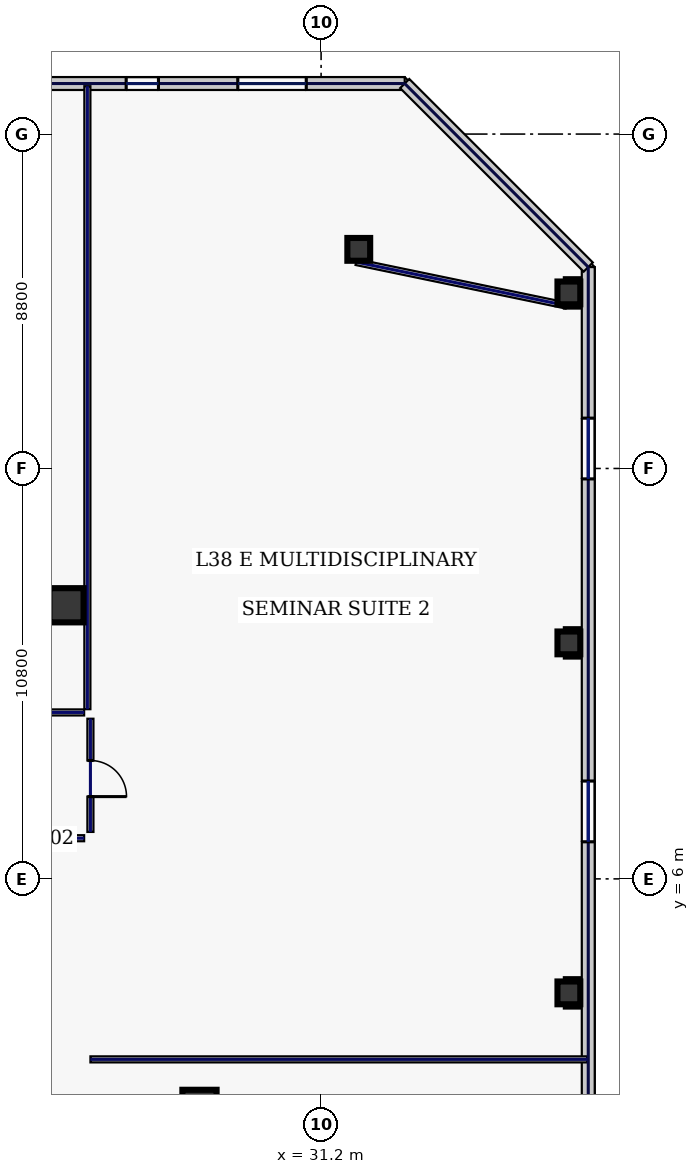
"""IFC4 building model, lengths in metres.
Left out: names, types, materials, properties, quantities, classifications, styles, units other than length and angle.
Written with IfcOpenShell. Run it as: python <this file> out.ifc"""

import sys

from ifc_helpers import new_model, si_unit, direction, frame, frame_2d, origin, origin_2d, place, context, subcontext, project, spatial, rectangle, hollow_rectangle, extrude, element, fill, save


model = new_model("IFC4")
c1 = context("Model", 3, precision=1e-05, world=origin(), true_north=direction((0.0, 1.0)))
c2 = subcontext(c1, "Body", "Model", "MODEL_VIEW")
j1 = project(units=[si_unit("LENGTHUNIT", "METRE"), si_unit("PLANEANGLEUNIT", "RADIAN")], contexts=[c1])
p1 = place(None, origin())
s1 = spatial("IfcSite", under=j1, at=p1, CompositionType="ELEMENT")
p2 = place(p1, origin())
s2 = spatial("IfcBuilding", under=s1, at=p2, CompositionType="ELEMENT")
p3 = place(p2, frame((0.0, 0.0, 168.2)))
s3 = spatial("IfcBuildingStorey", under=s2, at=p3, CompositionType="ELEMENT", Elevation=168.2)
for number, where, z_axis, x_axis in (
    (1, (24.5, 13.2, 0.0), (0.0, 0.0, 1.0), (1.0, 0.0, 0.0)),
    (2, (28.0, 0.0, 0.0), (0.0, 0.0, 1.0), (1.0, 0.0, 0.0)),
):
    element("IfcColumn", number, at=place(p3, frame(where, z_axis=z_axis, x_axis=x_axis)), inside=s3, PredefinedType="COLUMN", context=c2, shape_type="SweptSolid", body=[
        extrude(hollow_rectangle(XDim=0.9, YDim=0.9, WallThickness=0.04, at=origin_2d()), origin(), (0.0, 0.0, 1.0), 3.74),
    ])
for number, where, z_axis, x_axis in (
    (3, (32.191, 22.566, 0.0), (0.0, 0.0, 1.0), (1.0, 0.0, 0.0)),
    (4, (37.72, 3.0, 0.0), (0.0, 0.0, 1.0), (1.0, 0.0, 0.0)),
    (5, (37.72, 12.21, 0.0), (0.0, 0.0, 1.0), (1.0, 0.0, 0.0)),
    (6, (37.72, 21.42, 0.0), (0.0, 0.0, 1.0), (1.0, 0.0, 0.0)),
):
    element("IfcColumn", number, at=place(p3, frame(where, z_axis=z_axis, x_axis=x_axis)), inside=s3, PredefinedType="COLUMN", context=c2, shape_type="SweptSolid", body=[
        extrude(hollow_rectangle(XDim=0.6, YDim=0.6, WallThickness=0.028, at=origin_2d()), origin(), (0.0, 0.0, 1.0), 3.74),
    ])
p4 = place(p3, frame((33.4, 26.93, 0.0), z_axis=(0.0, 0.0, 1.0), x_axis=(-1.0, 0.0, 0.0)))
e7 = element("IfcWall", 7, at=p4, inside=s3, PredefinedType="STANDARD", context=c2, shape_type="SweptSolid", body=[
    extrude(rectangle(XDim=20.09, YDim=0.34, at=frame_2d((10.045, 0.0))), origin(), (0.0, 0.0, 1.0), 3.74),
])
p5 = place(p4, frame((15.005, 0.0, 0.7)))
e8 = element("IfcOpeningElement", 8, at=p5, cuts=e7, PredefinedType="OPENING", context=c2, shape_type="SweptSolid", body=[
    extrude(rectangle(XDim=1.8, YDim=2.2, at=frame_2d((0.9, 1.1))), frame((0.0, 0.18, 0.0), z_axis=(0.0, -1.0, 0.0), x_axis=(1.0, 0.0, 0.0)), (0.0, 0.0, 1.0), 0.36),
])
p6 = place(p4, frame((11.071, 0.0, 0.7)))
e9 = element("IfcOpeningElement", 9, at=p6, cuts=e7, PredefinedType="OPENING", context=c2, shape_type="SweptSolid", body=[
    extrude(rectangle(XDim=0.85, YDim=1.85, at=frame_2d((0.425, 0.925))), frame((0.0, 0.18, 0.0), z_axis=(0.0, -1.0, 0.0), x_axis=(1.0, 0.0, 0.0)), (0.0, 0.0, 1.0), 0.36),
])
p7 = place(p4, frame((6.48, 0.0, 0.7)))
e10 = element("IfcOpeningElement", 10, at=p7, cuts=e7, PredefinedType="OPENING", context=c2, shape_type="SweptSolid", body=[
    extrude(rectangle(XDim=0.85, YDim=1.85, at=frame_2d((0.425, 0.925))), frame((0.0, 0.18, 0.0), z_axis=(0.0, -1.0, 0.0), x_axis=(1.0, 0.0, 0.0)), (0.0, 0.0, 1.0), 0.36),
])
p8 = place(p4, frame((2.591, 0.0, 0.7)))
e11 = element("IfcOpeningElement", 11, at=p8, cuts=e7, PredefinedType="OPENING", context=c2, shape_type="SweptSolid", body=[
    extrude(rectangle(XDim=1.8, YDim=2.2, at=frame_2d((0.9, 1.1))), frame((0.0, 0.18, 0.0), z_axis=(0.0, -1.0, 0.0), x_axis=(1.0, 0.0, 0.0)), (0.0, 0.0, 1.0), 0.36),
])
p9 = place(p3, frame((38.23, -16.1, 0.0), z_axis=(0.0, 0.0, 1.0), x_axis=(0.0, 1.0, 0.0)))
e12 = element("IfcWall", 12, at=p9, inside=s3, PredefinedType="STANDARD", context=c2, shape_type="SweptSolid", body=[
    extrude(rectangle(XDim=38.2, YDim=0.34, at=frame_2d((19.1, 0.0))), origin(), (0.0, 0.0, 1.0), 3.74),
])
p10 = place(p9, frame((3.975, 0.0, 0.58)))
e13 = element("IfcOpeningElement", 13, at=p10, cuts=e12, PredefinedType="OPENING", context=c2, shape_type="SweptSolid", body=[
    extrude(rectangle(XDim=1.6, YDim=2.3, at=frame_2d((0.8, 1.15))), frame((0.0, 0.18, 0.0), z_axis=(0.0, -1.0, 0.0), x_axis=(1.0, 0.0, 0.0)), (0.0, 0.0, 1.0), 0.36),
])
p11 = place(p9, frame((13.525, 0.0, 0.58)))
e14 = element("IfcOpeningElement", 14, at=p11, cuts=e12, PredefinedType="OPENING", context=c2, shape_type="SweptSolid", body=[
    extrude(rectangle(XDim=1.6, YDim=2.3, at=frame_2d((0.8, 1.15))), frame((0.0, 0.18, 0.0), z_axis=(0.0, -1.0, 0.0), x_axis=(1.0, 0.0, 0.0)), (0.0, 0.0, 1.0), 0.36),
])
p12 = place(p9, frame((23.075, 0.0, 0.58)))
e15 = element("IfcOpeningElement", 15, at=p12, cuts=e12, PredefinedType="OPENING", context=c2, shape_type="SweptSolid", body=[
    extrude(rectangle(XDim=1.6, YDim=2.3, at=frame_2d((0.8, 1.15))), frame((0.0, 0.18, 0.0), z_axis=(0.0, -1.0, 0.0), x_axis=(1.0, 0.0, 0.0)), (0.0, 0.0, 1.0), 0.36),
])
p13 = place(p9, frame((32.625, 0.0, 0.58)))
e16 = element("IfcOpeningElement", 16, at=p13, cuts=e12, PredefinedType="OPENING", context=c2, shape_type="SweptSolid", body=[
    extrude(rectangle(XDim=1.6, YDim=2.3, at=frame_2d((0.8, 1.15))), frame((0.0, 0.18, 0.0), z_axis=(0.0, -1.0, 0.0), x_axis=(1.0, 0.0, 0.0)), (0.0, 0.0, 1.0), 0.36),
])
p14 = place(p3, frame((38.23, 22.1, 0.0), z_axis=(0.0, 0.0, 1.0), x_axis=(-0.707124652085, 0.707088909836, 0.0)))
e17 = element("IfcWall", 17, at=p14, inside=s3, PredefinedType="STANDARD", context=c2, shape_type="SweptSolid", body=[
    extrude(rectangle(XDim=6.831, YDim=0.34, at=frame_2d((3.415, 0.0))), origin(), (0.0, 0.0, 1.0), 3.74),
])
p15 = place(p3, frame((37.651, 21.087, 0.0), z_axis=(0.0, 0.0, 1.0), x_axis=(-0.979184618318, 0.202971631636, 0.0)))
e18 = element("IfcWall", 18, at=p15, inside=s3, PredefinedType="PARTITIONING", context=c2, shape_type="SweptSolid", body=[
    extrude(rectangle(XDim=5.646, YDim=0.16, at=frame_2d((2.823, 0.0))), origin(), (0.0, 0.0, 1.0), 3.74),
])
p16 = place(p3, frame((-24.965, 10.38, 0.0), z_axis=(0.0, 0.0, 1.0), x_axis=(1.0, 0.0, 0.0)))
e19 = element("IfcWall", 19, at=p16, inside=s3, PredefinedType="PARTITIONING", context=c2, shape_type="SweptSolid", body=[
    extrude(rectangle(XDim=49.93, YDim=0.16, at=frame_2d((24.965, 0.0))), origin(), (0.0, 0.0, 1.0), 3.74),
])
p17 = place(p16, frame((1.869, 0.0, 0.0)))
e20 = element("IfcOpeningElement", 20, at=p17, cuts=e19, PredefinedType="OPENING", context=c2, shape_type="SweptSolid", body=[
    extrude(rectangle(XDim=1.3, YDim=2.2, at=frame_2d((0.65, 1.1))), frame((0.0, 0.09, 0.0), z_axis=(0.0, -1.0, 0.0), x_axis=(1.0, 0.0, 0.0)), (0.0, 0.0, 1.0), 0.18),
])
p18 = place(p16, frame((7.54, 0.0, 0.0)))
e21 = element("IfcOpeningElement", 21, at=p18, cuts=e19, PredefinedType="OPENING", context=c2, shape_type="SweptSolid", body=[
    extrude(rectangle(XDim=0.95, YDim=2.2, at=frame_2d((0.475, 1.1))), frame((0.0, 0.09, 0.0), z_axis=(0.0, -1.0, 0.0), x_axis=(1.0, 0.0, 0.0)), (0.0, 0.0, 1.0), 0.18),
])
p19 = place(p16, frame((13.82, 0.0, 0.0)))
e22 = element("IfcOpeningElement", 22, at=p19, cuts=e19, PredefinedType="OPENING", context=c2, shape_type="SweptSolid", body=[
    extrude(rectangle(XDim=1.05, YDim=2.2, at=frame_2d((0.525, 1.1))), frame((0.0, 0.09, 0.0), z_axis=(0.0, -1.0, 0.0), x_axis=(1.0, 0.0, 0.0)), (0.0, 0.0, 1.0), 0.18),
])
p20 = place(p16, frame((19.295, 0.0, 0.0)))
e23 = element("IfcOpeningElement", 23, at=p20, cuts=e19, PredefinedType="OPENING", context=c2, shape_type="SweptSolid", body=[
    extrude(rectangle(XDim=1.3, YDim=2.2, at=frame_2d((0.65, 1.1))), frame((0.0, 0.09, 0.0), z_axis=(0.0, -1.0, 0.0), x_axis=(1.0, 0.0, 0.0)), (0.0, 0.0, 1.0), 0.18),
])
p21 = place(p16, frame((24.315, 0.0, 0.0)))
e24 = element("IfcOpeningElement", 24, at=p21, cuts=e19, PredefinedType="OPENING", context=c2, shape_type="SweptSolid", body=[
    extrude(rectangle(XDim=1.3, YDim=2.2, at=frame_2d((0.65, 1.1))), frame((0.0, 0.09, 0.0), z_axis=(0.0, -1.0, 0.0), x_axis=(1.0, 0.0, 0.0)), (0.0, 0.0, 1.0), 0.18),
])
p22 = place(p16, frame((30.11, 0.0, 0.0)))
e25 = element("IfcOpeningElement", 25, at=p22, cuts=e19, PredefinedType="OPENING", context=c2, shape_type="SweptSolid", body=[
    extrude(rectangle(XDim=0.95, YDim=2.2, at=frame_2d((0.475, 1.1))), frame((0.0, 0.09, 0.0), z_axis=(0.0, -1.0, 0.0), x_axis=(1.0, 0.0, 0.0)), (0.0, 0.0, 1.0), 0.18),
])
p23 = place(p16, frame((35.42, 0.0, 0.0)))
e26 = element("IfcOpeningElement", 26, at=p23, cuts=e19, PredefinedType="OPENING", context=c2, shape_type="SweptSolid", body=[
    extrude(rectangle(XDim=1.3, YDim=2.2, at=frame_2d((0.65, 1.1))), frame((0.0, 0.09, 0.0), z_axis=(0.0, -1.0, 0.0), x_axis=(1.0, 0.0, 0.0)), (0.0, 0.0, 1.0), 0.18),
])
p24 = place(p16, frame((41.36, 0.0, 0.0)))
e27 = element("IfcOpeningElement", 27, at=p24, cuts=e19, PredefinedType="OPENING", context=c2, shape_type="SweptSolid", body=[
    extrude(rectangle(XDim=1.05, YDim=2.2, at=frame_2d((0.525, 1.1))), frame((0.0, 0.09, 0.0), z_axis=(0.0, -1.0, 0.0), x_axis=(1.0, 0.0, 0.0)), (0.0, 0.0, 1.0), 0.18),
])
p25 = place(p16, frame((47.106, 0.0, 0.0)))
e28 = element("IfcOpeningElement", 28, at=p25, cuts=e19, PredefinedType="OPENING", context=c2, shape_type="SweptSolid", body=[
    extrude(rectangle(XDim=0.95, YDim=2.2, at=frame_2d((0.475, 1.1))), frame((0.0, 0.09, 0.0), z_axis=(0.0, -1.0, 0.0), x_axis=(1.0, 0.0, 0.0)), (0.0, 0.0, 1.0), 0.18),
])
p26 = place(p3, frame((25.13, 10.215, 0.0), z_axis=(0.0, 0.0, 1.0), x_axis=(0.0, -1.0, 0.0)))
e29 = element("IfcWall", 29, at=p26, inside=s3, PredefinedType="PARTITIONING", context=c2, shape_type="SweptSolid", body=[
    extrude(rectangle(XDim=2.98, YDim=0.16, at=frame_2d((1.49, 0.0))), origin(), (0.0, 0.0, 1.0), 3.74),
])
p27 = place(p26, frame((1.1, 0.0, 0.0)))
e30 = element("IfcOpeningElement", 30, at=p27, cuts=e29, PredefinedType="OPENING", context=c2, shape_type="SweptSolid", body=[
    extrude(rectangle(XDim=0.95, YDim=2.2, at=frame_2d((0.475, 1.1))), frame((0.0, 0.09, 0.0), z_axis=(0.0, -1.0, 0.0), x_axis=(1.0, 0.0, 0.0)), (0.0, 0.0, 1.0), 0.18),
])
p28 = place(p3, frame((24.965, 7.07, 0.0), z_axis=(0.0, 0.0, 1.0), x_axis=(-1.0, 0.0, 0.0)))
e31 = element("IfcWall", 31, at=p28, inside=s3, PredefinedType="PARTITIONING", context=c2, shape_type="SweptSolid", body=[
    extrude(rectangle(XDim=14.25, YDim=0.16, at=frame_2d((7.125, 0.0))), origin(), (0.0, 0.0, 1.0), 3.74),
])
p29 = place(p3, frame((25.05, 10.465, 0.0), z_axis=(0.0, 0.0, 1.0), x_axis=(0.0, 1.0, 0.0)))
e32 = element("IfcWall", 32, at=p29, inside=s3, PredefinedType="PARTITIONING", context=c2, shape_type="SweptSolid", body=[
    extrude(rectangle(XDim=16.395, YDim=0.16, at=frame_2d((8.198, 0.0))), origin(), (0.0, 0.0, 1.0), 3.74),
])
p30 = place(p3, frame((25.13, 1.25, 0.0), z_axis=(0.0, 0.0, 1.0), x_axis=(1.0, 0.0, 0.0)))
e33 = element("IfcWall", 33, at=p30, inside=s3, PredefinedType="PARTITIONING", context=c2, shape_type="SweptSolid", body=[
    extrude(rectangle(XDim=13.08, YDim=0.16, at=frame_2d((6.54, 0.0))), origin(), (0.0, 0.0, 1.0), 3.285),
])
p31 = place(p7, origin())
e34 = element("IfcWindow", 34, at=p31, inside=s3, PartitioningType="SINGLE_PANEL", PredefinedType="WINDOW", context=c2, shape_type="SweptSolid", body=[
    extrude(rectangle(XDim=0.85, YDim=1.85, at=frame_2d((0.425, 0.925))), frame((0.0, 0.03, 0.0), z_axis=(0.0, -1.0, 0.0), x_axis=(1.0, 0.0, 0.0)), (0.0, 0.0, 1.0), 0.06),
])
fill(e10, e34)
p32 = place(p8, origin())
e35 = element("IfcWindow", 35, at=p32, inside=s3, PartitioningType="SINGLE_PANEL", PredefinedType="WINDOW", context=c2, shape_type="SweptSolid", body=[
    extrude(rectangle(XDim=1.8, YDim=2.2, at=frame_2d((0.9, 1.1))), frame((0.0, 0.03, 0.0), z_axis=(0.0, -1.0, 0.0), x_axis=(1.0, 0.0, 0.0)), (0.0, 0.0, 1.0), 0.06),
])
fill(e11, e35)
p33 = place(p12, origin())
e36 = element("IfcWindow", 36, at=p33, inside=s3, PartitioningType="SINGLE_PANEL", PredefinedType="WINDOW", context=c2, shape_type="SweptSolid", body=[
    extrude(rectangle(XDim=1.6, YDim=2.3, at=frame_2d((0.8, 1.15))), frame((0.0, 0.03, 0.0), z_axis=(0.0, -1.0, 0.0), x_axis=(1.0, 0.0, 0.0)), (0.0, 0.0, 1.0), 0.06),
])
fill(e15, e36)
p34 = place(p13, origin())
e37 = element("IfcWindow", 37, at=p34, inside=s3, PartitioningType="SINGLE_PANEL", PredefinedType="WINDOW", context=c2, shape_type="SweptSolid", body=[
    extrude(rectangle(XDim=1.6, YDim=2.3, at=frame_2d((0.8, 1.15))), frame((0.0, 0.03, 0.0), z_axis=(0.0, -1.0, 0.0), x_axis=(1.0, 0.0, 0.0)), (0.0, 0.0, 1.0), 0.06),
])
fill(e16, e37)
p35 = place(p27, origin())
e38 = element("IfcDoor", 38, at=p35, inside=s3, OperationType="SINGLE_SWING_RIGHT", PredefinedType="DOOR", context=c2, shape_type="SweptSolid", body=[
    extrude(rectangle(XDim=0.95, YDim=2.2, at=frame_2d((0.475, 1.1))), frame((0.0, 0.025, 0.0), z_axis=(0.0, -1.0, 0.0), x_axis=(1.0, 0.0, 0.0)), (0.0, 0.0, 1.0), 0.05),
])
fill(e30, e38)
save(model, sys.argv[1])
